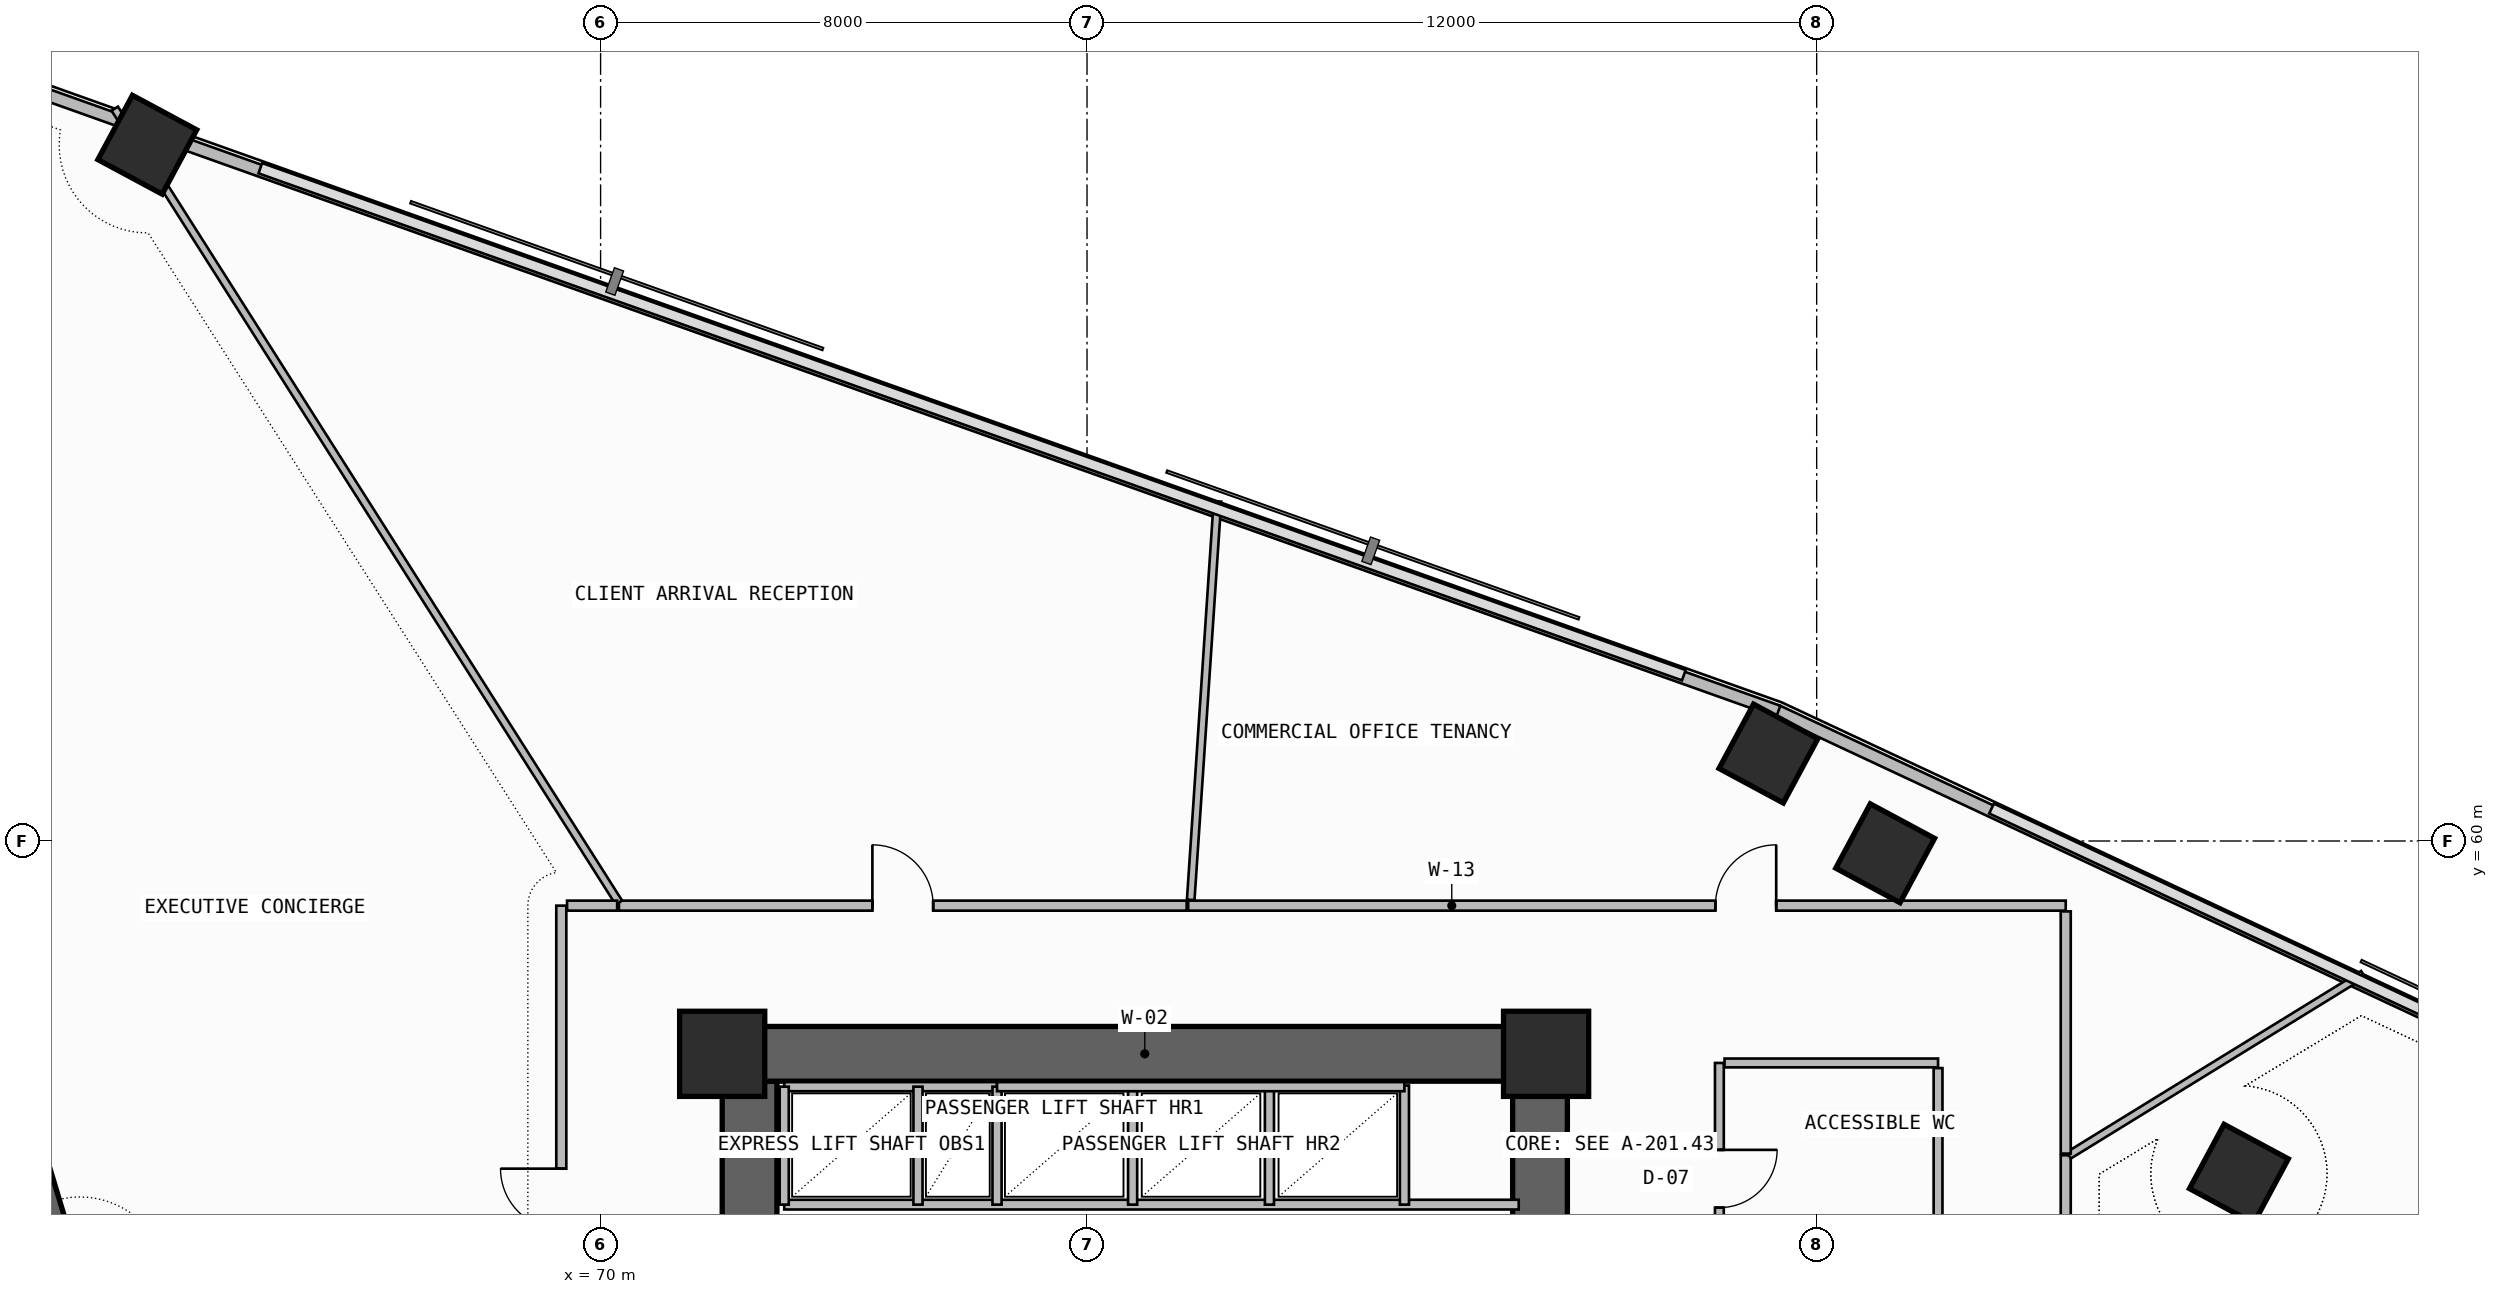
"""IFC4 building model, lengths in metres.
Left out: names, types, materials, properties, quantities, classifications, styles, units other than length and angle.
Written with IfcOpenShell. Run it as: python <this file> out.ifc"""

import sys

from ifc_helpers import new_model, si_unit, direction, frame, frame_2d, origin, origin_2d, place, context, subcontext, project, spatial, rectangle, extrude, element, fill, save


model = new_model("IFC4")
c1 = context("Model", 3, precision=1e-05, world=origin(), true_north=direction((0.0, 1.0)))
c2 = subcontext(c1, "Body", "Model", "MODEL_VIEW")
j1 = project(units=[si_unit("LENGTHUNIT", "METRE"), si_unit("PLANEANGLEUNIT", "RADIAN")], contexts=[c1])
p1 = place(None, origin())
s1 = spatial("IfcSite", under=j1, at=p1, CompositionType="ELEMENT")
p2 = place(p1, origin())
s2 = spatial("IfcBuilding", under=s1, at=p2, CompositionType="ELEMENT")
p3 = place(p2, frame((0.0, 0.0, 153.9)))
s3 = spatial("IfcBuildingStorey", under=s2, at=p3, CompositionType="ELEMENT", Elevation=153.9)
p4 = place(p3, frame((72.45, 43.35, -0.26), z_axis=(0.0, 0.0, 1.0), x_axis=(0.0, 1.0, 0.0)))
e1 = element("IfcWall", 1, at=p4, inside=s3, PredefinedType="SHEAR", context=c2, shape_type="SweptSolid", body=[
    extrude(rectangle(XDim=12.7, YDim=0.9, at=frame_2d((6.35, 0.0))), origin(), (0.0, 0.0, 1.0), 3.6),
])
p5 = place(p4, frame((1.35, 0.0, 0.26)))
e2 = element("IfcOpeningElement", 2, at=p5, cuts=e1, PredefinedType="OPENING", context=c2, shape_type="SweptSolid", body=[
    extrude(rectangle(XDim=1.2, YDim=2.2, at=frame_2d((0.6, 1.1))), frame((0.0, 0.46, 0.0), z_axis=(0.0, -1.0, 0.0), x_axis=(1.0, 0.0, 0.0)), (0.0, 0.0, 1.0), 0.92),
])
p6 = place(p3, frame((72.0, 56.5, -0.26), z_axis=(0.0, 0.0, 1.0), x_axis=(1.0, 0.0, 0.0)))
e3 = element("IfcWall", 3, at=p6, inside=s3, PredefinedType="SHEAR", context=c2, shape_type="SweptSolid", body=[
    extrude(rectangle(XDim=13.9, YDim=0.9, at=frame_2d((6.95, 0.0))), origin(), (0.0, 0.0, 1.0), 3.6),
])
p7 = place(p3, frame((85.45, 47.6, -0.26), z_axis=(0.0, 0.0, 1.0), x_axis=(0.0, 1.0, 0.0)))
e4 = element("IfcWall", 4, at=p7, inside=s3, PredefinedType="SHEAR", context=c2, shape_type="SweptSolid", body=[
    extrude(rectangle(XDim=8.45, YDim=0.9, at=frame_2d((4.225, 0.0))), origin(), (0.0, 0.0, 1.0), 3.6),
])
for number, where, z_axis, x_axis in (
    (5, (72.0, 56.5, 0.0), (0.0, 0.0, 1.0), (1.0, 0.0, 0.0)),
    (6, (85.55, 56.5, 0.0), (0.0, 0.0, 1.0), (1.0, 0.0, 0.0)),
):
    element("IfcColumn", number, at=place(p3, frame(where, z_axis=z_axis, x_axis=x_axis)), inside=s3, PredefinedType="COLUMN", context=c2, shape_type="SweptSolid", body=[
        extrude(rectangle(XDim=1.4, YDim=1.4, at=origin_2d()), origin(), (0.0, 0.0, 1.0), 3.6),
    ])
for number, where, z_axis, x_axis in (
    (7, (96.944, 54.528, 0.0), (0.0, 0.0, 1.0), (0.473, 0.881, 0.0)),
    (8, (91.126, 59.798, 0.0), (0.0, 0.0, 1.0), (0.473, 0.881, 0.0)),
    (9, (89.207, 61.438, 0.0), (0.0, 0.0, 1.0), (0.473, 0.881, 0.0)),
    (10, (62.545, 71.45, 0.0), (0.0, 0.0, 1.0), (0.473, 0.881, 0.0)),
):
    element("IfcColumn", number, at=place(p3, frame(where, z_axis=z_axis, x_axis=x_axis)), inside=s3, PredefinedType="COLUMN", context=c2, shape_type="SweptSolid", body=[
        extrude(rectangle(XDim=1.2, YDim=1.2, at=origin_2d()), origin(), (0.0, 0.0, 1.0), 3.6),
    ])
p8 = place(p3, frame((57.323, 65.434, -0.26), z_axis=(0.0, 0.0, 1.0), x_axis=(0.288188159352, -0.957573801234, 0.0)))
e11 = element("IfcWall", 11, at=p8, inside=s3, PredefinedType="SHEAR", context=c2, shape_type="SweptSolid", body=[
    extrude(rectangle(XDim=20.469, YDim=0.7, at=frame_2d((10.234, 0.0))), origin(), (0.0, 0.0, 1.0), 3.6),
])
p9 = place(p8, frame((15.3, 0.0, 1.2)))
e12 = element("IfcOpeningElement", 12, at=p9, cuts=e11, PredefinedType="OPENING", context=c2, shape_type="SweptSolid", body=[
    extrude(rectangle(XDim=1.8, YDim=0.9, at=frame_2d((0.9, 0.45))), frame((0.0, 0.36, 0.0), z_axis=(0.0, -1.0, 0.0), x_axis=(1.0, 0.0, 0.0)), (0.0, 0.0, 1.0), 0.72),
])
p10 = place(p3, frame((119.926, 47.843, 0.0), z_axis=(0.0, 0.0, 1.0), x_axis=(-0.905880730846, 0.423532881228, 0.0)))
e13 = element("IfcWall", 13, at=p10, inside=s3, PredefinedType="PARAPET", context=c2, shape_type="SweptSolid", body=[
    extrude(rectangle(XDim=33.748, YDim=0.2, at=frame_2d((16.874, 0.0))), origin(), (0.0, 0.0, 1.0), 1.15),
])
p11 = place(p3, frame((89.368, 62.13, 0.0), z_axis=(0.0, 0.0, 1.0), x_axis=(-0.942033439765, 0.335518998515, 0.0)))
e14 = element("IfcWall", 14, at=p11, inside=s3, PredefinedType="PARAPET", context=c2, shape_type="SweptSolid", body=[
    extrude(rectangle(XDim=27.969, YDim=0.2, at=frame_2d((13.985, 0.0))), origin(), (0.0, 0.0, 1.0), 1.15),
])
p12 = place(p3, frame((62.218, 71.801, 0.0), z_axis=(0.0, 0.0, 1.0), x_axis=(-0.942038862895, 0.335503771655, 0.0)))
e15 = element("IfcWall", 15, at=p12, inside=s3, PredefinedType="PARAPET", context=c2, shape_type="SweptSolid", body=[
    extrude(rectangle(XDim=4.942, YDim=0.2, at=frame_2d((2.471, 0.0))), origin(), (0.0, 0.0, 1.0), 1.15),
])
p13 = place(p3, frame((73.02, 54.02, 0.0), z_axis=(0.0, 0.0, 1.0), x_axis=(1.0, 0.0, 0.0)))
e16 = element("IfcWall", 16, at=p13, inside=s3, PredefinedType="SOLIDWALL", context=c2, shape_type="SweptSolid", body=[
    extrude(rectangle(XDim=12.08, YDim=0.16, at=frame_2d((6.04, 0.0))), origin(), (0.0, 0.0, 1.0), 3.34),
])
p14 = place(p3, frame((73.02, 55.96, 0.0), z_axis=(0.0, 0.0, 1.0), x_axis=(1.0, 0.0, 0.0)))
e17 = element("IfcWall", 17, at=p14, inside=s3, PredefinedType="SOLIDWALL", context=c2, shape_type="SweptSolid", body=[
    extrude(rectangle(XDim=3.5, YDim=0.15, at=frame_2d((1.75, 0.0))), origin(), (0.0, 0.0, 1.0), 3.34),
])
p15 = place(p3, frame((73.02, 54.02, 0.0), z_axis=(0.0, 0.0, 1.0), x_axis=(0.0, 1.0, 0.0)))
e18 = element("IfcWall", 18, at=p15, inside=s3, PredefinedType="PLUMBINGWALL", context=c2, shape_type="SweptSolid", body=[
    extrude(rectangle(XDim=1.94, YDim=0.15, at=frame_2d((0.97, 0.0))), origin(), (0.0, 0.0, 1.0), 3.34),
])
p16 = place(p3, frame((76.52, 54.02, 0.0), z_axis=(0.0, 0.0, 1.0), x_axis=(0.0, 1.0, 0.0)))
e19 = element("IfcWall", 19, at=p16, inside=s3, PredefinedType="SOLIDWALL", context=c2, shape_type="SweptSolid", body=[
    extrude(rectangle(XDim=1.94, YDim=0.15, at=frame_2d((0.97, 0.0))), origin(), (0.0, 0.0, 1.0), 3.34),
])
p17 = place(p3, frame((75.22, 54.02, 0.0), z_axis=(0.0, 0.0, 1.0), x_axis=(0.0, 1.0, 0.0)))
e20 = element("IfcWall", 20, at=p17, inside=s3, PredefinedType="PLUMBINGWALL", context=c2, shape_type="SweptSolid", body=[
    extrude(rectangle(XDim=1.94, YDim=0.15, at=frame_2d((0.97, 0.0))), origin(), (0.0, 0.0, 1.0), 3.34),
])
for number, where, z_axis, x_axis in (
    (21, (78.75, 54.02, 0.0), (0.0, 0.0, 1.0), (0.0, 1.0, 0.0)),
    (22, (81.0, 54.02, 0.0), (0.0, 0.0, 1.0), (0.0, 1.0, 0.0)),
):
    element("IfcWall", number, at=place(p3, frame(where, z_axis=z_axis, x_axis=x_axis)), inside=s3, PredefinedType="PLUMBINGWALL", context=c2, shape_type="SweptSolid", body=[
        extrude(rectangle(XDim=1.96, YDim=0.15, at=frame_2d((0.98, 0.0))), origin(), (0.0, 0.0, 1.0), 3.34),
    ])
p18 = place(p3, frame((83.22, 54.02, 0.0), z_axis=(0.0, 0.0, 1.0), x_axis=(0.0, 1.0, 0.0)))
e23 = element("IfcWall", 23, at=p18, inside=s3, PredefinedType="SOLIDWALL", context=c2, shape_type="SweptSolid", body=[
    extrude(rectangle(XDim=1.96, YDim=0.15, at=frame_2d((0.98, 0.0))), origin(), (0.0, 0.0, 1.0), 3.34),
])
p19 = place(p3, frame((76.52, 55.96, 0.0), z_axis=(0.0, 0.0, 1.0), x_axis=(1.0, 0.0, 0.0)))
e24 = element("IfcWall", 24, at=p19, inside=s3, PredefinedType="SOLIDWALL", context=c2, shape_type="SweptSolid", body=[
    extrude(rectangle(XDim=6.7, YDim=0.15, at=frame_2d((3.35, 0.0))), origin(), (0.0, 0.0, 1.0), 3.34),
])
p20 = place(p3, frame((94.096, 45.278, 0.0), z_axis=(0.0, 0.0, 1.0), x_axis=(0.0, 1.0, 0.0)))
e25 = element("IfcWall", 25, at=p20, inside=s3, PredefinedType="PARTITIONING", context=c2, shape_type="SweptSolid", body=[
    extrude(rectangle(XDim=9.553, YDim=0.165, at=frame_2d((4.777, 0.0))), origin(), (0.0, 0.0, 1.0), 2.725),
])
p21 = place(p20, frame((4.277, 0.0, 0.0)))
e26 = element("IfcOpeningElement", 26, at=p21, cuts=e25, PredefinedType="OPENING", context=c2, shape_type="SweptSolid", body=[
    extrude(rectangle(XDim=1.0, YDim=2.2, at=frame_2d((0.5, 1.1))), frame((0.0, 0.093, 0.0), z_axis=(0.0, -1.0, 0.0), x_axis=(1.0, 0.0, 0.0)), (0.0, 0.0, 1.0), 0.185),
])
p22 = place(p3, frame((94.148, 54.832, 0.0), z_axis=(0.0, 0.0, 1.0), x_axis=(0.851656841351, 0.524099823106, 0.0)))
e27 = element("IfcWall", 27, at=p22, inside=s3, PredefinedType="PARTITIONING", context=c2, shape_type="SweptSolid", body=[
    extrude(rectangle(XDim=5.682, YDim=0.125, at=frame_2d((2.841, 0.0))), origin(), (0.0, 0.0, 1.0), 2.725),
])
p23 = place(p3, frame((88.4, 51.487, 0.0), z_axis=(0.0, 0.0, 1.0), x_axis=(0.0, 1.0, 0.0)))
e28 = element("IfcWall", 28, at=p23, inside=s3, PredefinedType="PARTITIONING", context=c2, shape_type="SweptSolid", body=[
    extrude(rectangle(XDim=4.863, YDim=0.145, at=frame_2d((2.431, 0.0))), origin(), (0.0, 0.0, 1.0), 2.725),
])
p24 = place(p23, frame((2.483, 0.0, 0.0)))
e29 = element("IfcOpeningElement", 29, at=p24, cuts=e28, PredefinedType="OPENING", context=c2, shape_type="SweptSolid", body=[
    extrude(rectangle(XDim=0.95, YDim=2.15, at=frame_2d((0.475, 1.075))), frame((0.0, 0.083, 0.0), z_axis=(0.0, -1.0, 0.0), x_axis=(1.0, 0.0, 0.0)), (0.0, 0.0, 1.0), 0.165),
])
p25 = place(p3, frame((88.485, 56.35, 0.0), z_axis=(0.0, 0.0, 1.0), x_axis=(1.0, 0.0, 0.0)))
e30 = element("IfcWall", 30, at=p25, inside=s3, PredefinedType="PARTITIONING", context=c2, shape_type="SweptSolid", body=[
    extrude(rectangle(XDim=3.512, YDim=0.145, at=frame_2d((1.756, 0.0))), origin(), (0.0, 0.0, 1.0), 2.925),
])
p26 = place(p3, frame((91.996, 56.265, 0.0), z_axis=(0.0, 0.0, 1.0), x_axis=(0.0, -1.0, 0.0)))
e31 = element("IfcWall", 31, at=p26, inside=s3, PredefinedType="PARTITIONING", context=c2, shape_type="SweptSolid", body=[
    extrude(rectangle(XDim=2.675, YDim=0.145, at=frame_2d((1.338, 0.0))), origin(), (0.0, 0.0, 1.0), 2.725),
])
p27 = place(p3, frame((94.096, 58.937, 0.0), z_axis=(0.0, 0.0, 1.0), x_axis=(-1.0, 0.0, 0.0)))
e32 = element("IfcWall", 32, at=p27, inside=s3, PredefinedType="PARTITIONING", context=c2, shape_type="SweptSolid", body=[
    extrude(rectangle(XDim=14.433, YDim=0.165, at=frame_2d((7.217, 0.0))), origin(), (0.0, 0.0, 1.0), 2.725),
])
p28 = place(p27, frame((4.762, 0.0, 0.0)))
e33 = element("IfcOpeningElement", 33, at=p28, cuts=e32, PredefinedType="OPENING", context=c2, shape_type="SweptSolid", body=[
    extrude(rectangle(XDim=1.0, YDim=2.2, at=frame_2d((0.5, 1.1))), frame((0.0, 0.093, 0.0), z_axis=(0.0, -1.0, 0.0), x_axis=(1.0, 0.0, 0.0)), (0.0, 0.0, 1.0), 0.185),
])
p29 = place(p3, frame((94.096, 54.86, 0.0), z_axis=(0.0, 0.0, 1.0), x_axis=(0.0, 1.0, 0.0)))
e34 = element("IfcWall", 34, at=p29, inside=s3, PredefinedType="PARTITIONING", context=c2, shape_type="SweptSolid", body=[
    extrude(rectangle(XDim=3.983, YDim=0.165, at=frame_2d((1.991, 0.0))), origin(), (0.0, 0.0, 1.0), 2.725),
])
p30 = place(p3, frame((79.705, 59.031, 0.0), z_axis=(0.0, 0.0, 1.0), x_axis=(0.06697785505, 0.997754462247, 0.0)))
e35 = element("IfcWall", 35, at=p30, inside=s3, PredefinedType="PARTITIONING", context=c2, shape_type="SweptSolid", body=[
    extrude(rectangle(XDim=6.568, YDim=0.125, at=frame_2d((3.284, 0.0))), origin(), (0.0, 0.0, 1.0), 3.34),
])
p31 = place(p3, frame((79.639, 58.937, 0.0), z_axis=(0.0, 0.0, 1.0), x_axis=(-1.0, 0.0, 0.0)))
e36 = element("IfcWall", 36, at=p31, inside=s3, PredefinedType="PARTITIONING", context=c2, shape_type="SweptSolid", body=[
    extrude(rectangle(XDim=9.338, YDim=0.165, at=frame_2d((4.669, 0.0))), origin(), (0.0, 0.0, 1.0), 2.725),
])
p32 = place(p31, frame((4.169, 0.0, 0.0)))
e37 = element("IfcOpeningElement", 37, at=p32, cuts=e36, PredefinedType="OPENING", context=c2, shape_type="SweptSolid", body=[
    extrude(rectangle(XDim=1.0, YDim=2.2, at=frame_2d((0.5, 1.1))), frame((0.0, 0.093, 0.0), z_axis=(0.0, -1.0, 0.0), x_axis=(1.0, 0.0, 0.0)), (0.0, 0.0, 1.0), 0.185),
])
p33 = place(p3, frame((70.301, 58.987, 0.0), z_axis=(0.0, 0.0, 1.0), x_axis=(-0.536044918422, 0.844189460627, 0.0)))
e38 = element("IfcWall", 38, at=p33, inside=s3, PredefinedType="PARTITIONING", context=c2, shape_type="SweptSolid", body=[
    extrude(rectangle(XDim=15.468, YDim=0.125, at=frame_2d((7.734, 0.0))), origin(), (0.0, 0.0, 1.0), 2.725),
])
p34 = place(p3, frame((69.354, 58.937, 0.0), z_axis=(0.0, 0.0, 1.0), x_axis=(0.0, -1.0, 0.0)))
e39 = element("IfcWall", 39, at=p34, inside=s3, PredefinedType="PARTITIONING", context=c2, shape_type="SweptSolid", body=[
    extrude(rectangle(XDim=9.651, YDim=0.165, at=frame_2d((4.825, 0.0))), origin(), (0.0, 0.0, 1.0), 2.725),
])
p35 = place(p34, frame((4.325, 0.0, 0.0)))
e40 = element("IfcOpeningElement", 40, at=p35, cuts=e39, PredefinedType="OPENING", context=c2, shape_type="SweptSolid", body=[
    extrude(rectangle(XDim=1.0, YDim=2.2, at=frame_2d((0.5, 1.1))), frame((0.0, 0.093, 0.0), z_axis=(0.0, -1.0, 0.0), x_axis=(1.0, 0.0, 0.0)), (0.0, 0.0, 1.0), 0.185),
])
p36 = place(p3, frame((70.273, 58.937, 0.0), z_axis=(0.0, 0.0, 1.0), x_axis=(-1.0, 0.0, 0.0)))
e41 = element("IfcWall", 41, at=p36, inside=s3, PredefinedType="PARTITIONING", context=c2, shape_type="SweptSolid", body=[
    extrude(rectangle(XDim=0.824, YDim=0.165, at=frame_2d((0.412, 0.0))), origin(), (0.0, 0.0, 1.0), 2.725),
])
p37 = place(p24, frame((0.95, 0.0, 0.0), z_axis=(0.0, 0.0, 1.0), x_axis=(-1.0, 0.0, 0.0)))
e42 = element("IfcDoor", 42, at=p37, inside=s3, OperationType="SINGLE_SWING_LEFT", PredefinedType="DOOR", context=c2, shape_type="SweptSolid", body=[
    extrude(rectangle(XDim=0.95, YDim=2.15, at=frame_2d((0.475, 1.075))), frame((0.0, 0.025, 0.0), z_axis=(0.0, -1.0, 0.0), x_axis=(1.0, 0.0, 0.0)), (0.0, 0.0, 1.0), 0.05),
])
fill(e29, e42)
p38 = place(p28, frame((1.0, 0.0, 0.0), z_axis=(0.0, 0.0, 1.0), x_axis=(-1.0, 0.0, 0.0)))
e43 = element("IfcDoor", 43, at=p38, inside=s3, OperationType="SINGLE_SWING_RIGHT", PredefinedType="DOOR", context=c2, shape_type="SweptSolid", body=[
    extrude(rectangle(XDim=1.0, YDim=2.2, at=frame_2d((0.5, 1.1))), frame((0.0, 0.025, 0.0), z_axis=(0.0, -1.0, 0.0), x_axis=(1.0, 0.0, 0.0)), (0.0, 0.0, 1.0), 0.05),
])
fill(e33, e43)
p39 = place(p32, frame((1.0, 0.0, 0.0), z_axis=(0.0, 0.0, 1.0), x_axis=(-1.0, 0.0, 0.0)))
e44 = element("IfcDoor", 44, at=p39, inside=s3, OperationType="SINGLE_SWING_LEFT", PredefinedType="DOOR", context=c2, shape_type="SweptSolid", body=[
    extrude(rectangle(XDim=1.0, YDim=2.2, at=frame_2d((0.5, 1.1))), frame((0.0, 0.025, 0.0), z_axis=(0.0, -1.0, 0.0), x_axis=(1.0, 0.0, 0.0)), (0.0, 0.0, 1.0), 0.05),
])
fill(e37, e44)
p40 = place(p35, frame((1.0, 0.0, 0.0), z_axis=(0.0, 0.0, 1.0), x_axis=(-1.0, 0.0, 0.0)))
e45 = element("IfcDoor", 45, at=p40, inside=s3, OperationType="SINGLE_SWING_RIGHT", PredefinedType="DOOR", context=c2, shape_type="SweptSolid", body=[
    extrude(rectangle(XDim=1.0, YDim=2.2, at=frame_2d((0.5, 1.1))), frame((0.0, 0.025, 0.0), z_axis=(0.0, -1.0, 0.0), x_axis=(1.0, 0.0, 0.0)), (0.0, 0.0, 1.0), 0.05),
])
fill(e40, e45)
save(model, sys.argv[1])
